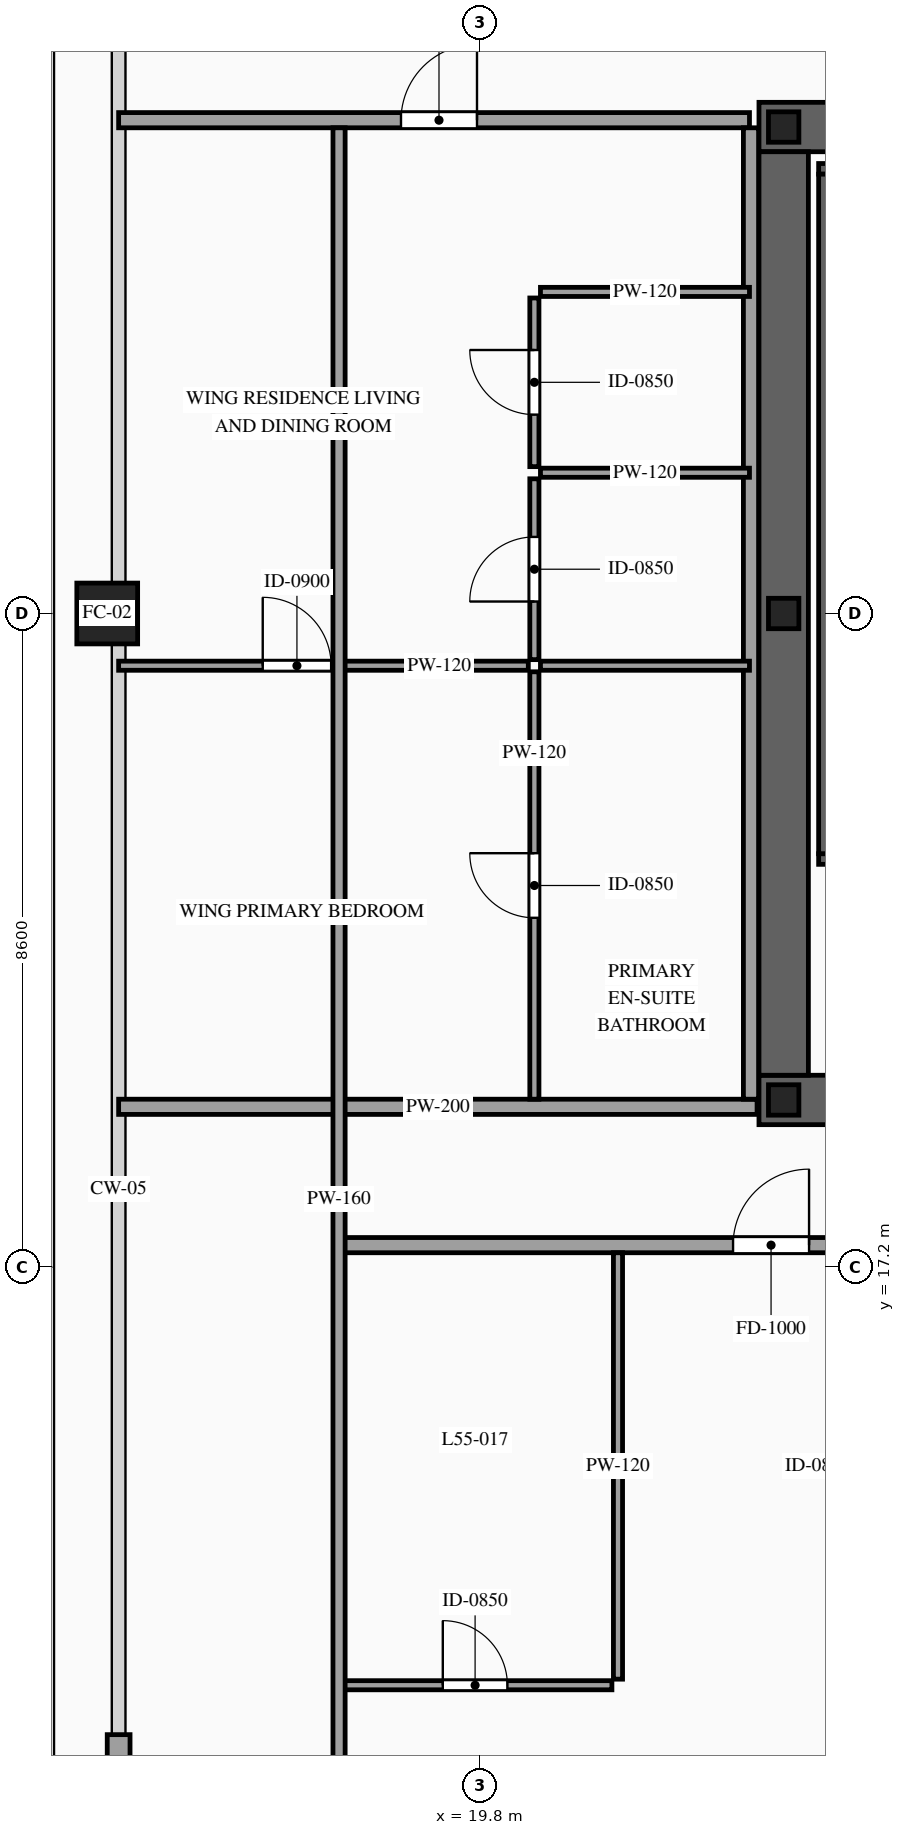
"""IFC4 building model, lengths in metres.
Left out: names, types, materials, properties, quantities, classifications, styles, units other than length and angle.
Written with IfcOpenShell. Run it as: python <this file> out.ifc"""

import sys

from ifc_helpers import new_model, si_unit, direction, frame, frame_2d, origin, origin_2d, place, context, subcontext, project, spatial, rectangle, hollow_rectangle, i_section, extrude, source, transform, mapped, element, fill, save


model = new_model("IFC4")
c1 = context("Model", 3, precision=1e-05, world=origin(), true_north=direction((0.0, 1.0)))
c2 = subcontext(c1, "Body", "Model", "MODEL_VIEW")
j1 = project(units=[si_unit("LENGTHUNIT", "METRE"), si_unit("PLANEANGLEUNIT", "RADIAN")], contexts=[c1])
p1 = place(None, origin())
s1 = spatial("IfcSite", under=j1, at=p1, CompositionType="ELEMENT")
p2 = place(p1, origin())
s2 = spatial("IfcBuilding", under=s1, at=p2, CompositionType="ELEMENT")
p3 = place(p2, frame((0.0, 0.0, 209.0)))
s3 = spatial("IfcBuildingStorey", under=s2, at=p3, CompositionType="ELEMENT", Elevation=209.0)
p4 = place(p3, frame((23.475, 19.4, 0.0), z_axis=(0.0, 0.0, 1.0), x_axis=(1.0, 0.0, 0.0)))
e1 = element("IfcWall", 1, at=p4, inside=s3, PredefinedType="SHEAR", context=c2, shape_type="SweptSolid", body=[
    extrude(rectangle(XDim=27.05, YDim=0.65, at=frame_2d((13.525, 0.0))), origin(), (0.0, 0.0, 1.0), 3.5),
])
p5 = place(p4, frame((1.975, 0.0, 0.0)))
e2 = element("IfcOpeningElement", 2, at=p5, cuts=e1, PredefinedType="OPENING", context=c2, shape_type="SweptSolid", body=[
    extrude(rectangle(XDim=1.1, YDim=2.2, at=frame_2d((0.55, 1.1))), frame((0.0, 0.34, 0.0), z_axis=(0.0, -1.0, 0.0), x_axis=(1.0, 0.0, 0.0)), (0.0, 0.0, 1.0), 0.68),
])
p6 = place(p4, frame((9.875, 0.0, 0.0)))
e3 = element("IfcOpeningElement", 3, at=p6, cuts=e1, PredefinedType="OPENING", context=c2, shape_type="SweptSolid", body=[
    extrude(rectangle(XDim=1.1, YDim=2.2, at=frame_2d((0.55, 1.1))), frame((0.0, 0.34, 0.0), z_axis=(0.0, -1.0, 0.0), x_axis=(1.0, 0.0, 0.0)), (0.0, 0.0, 1.0), 0.68),
])
p7 = place(p4, frame((23.075, 0.0, 0.0)))
e4 = element("IfcOpeningElement", 4, at=p7, cuts=e1, PredefinedType="OPENING", context=c2, shape_type="SweptSolid", body=[
    extrude(rectangle(XDim=1.1, YDim=2.2, at=frame_2d((0.55, 1.1))), frame((0.0, 0.34, 0.0), z_axis=(0.0, -1.0, 0.0), x_axis=(1.0, 0.0, 0.0)), (0.0, 0.0, 1.0), 0.68),
])
p8 = place(p4, frame((19.695, 0.0, 0.0)))
e5 = element("IfcOpeningElement", 5, at=p8, cuts=e1, PredefinedType="OPENING", context=c2, shape_type="SweptSolid", body=[
    extrude(rectangle(XDim=0.9, YDim=2.15, at=frame_2d((0.45, 1.075))), frame((0.0, 0.34, 0.0), z_axis=(0.0, -1.0, 0.0), x_axis=(1.0, 0.0, 0.0)), (0.0, 0.0, 1.0), 0.68),
])
p9 = place(p4, frame((18.255, 0.0, 0.0)))
e6 = element("IfcOpeningElement", 6, at=p9, cuts=e1, PredefinedType="OPENING", context=c2, shape_type="SweptSolid", body=[
    extrude(rectangle(XDim=0.9, YDim=2.15, at=frame_2d((0.45, 1.075))), frame((0.0, 0.34, 0.0), z_axis=(0.0, -1.0, 0.0), x_axis=(1.0, 0.0, 0.0)), (0.0, 0.0, 1.0), 0.68),
])
p10 = place(p3, frame((23.475, 32.2, 0.0), z_axis=(0.0, 0.0, 1.0), x_axis=(1.0, 0.0, 0.0)))
e7 = element("IfcWall", 7, at=p10, inside=s3, PredefinedType="SHEAR", context=c2, shape_type="SweptSolid", body=[
    extrude(rectangle(XDim=27.05, YDim=0.65, at=frame_2d((13.525, 0.0))), origin(), (0.0, 0.0, 1.0), 3.5),
])
p11 = place(p10, frame((4.595, 0.0, 0.0)))
e8 = element("IfcOpeningElement", 8, at=p11, cuts=e7, PredefinedType="OPENING", context=c2, shape_type="SweptSolid", body=[
    extrude(rectangle(XDim=0.9, YDim=2.15, at=frame_2d((0.45, 1.075))), frame((0.0, 0.34, 0.0), z_axis=(0.0, -1.0, 0.0), x_axis=(1.0, 0.0, 0.0)), (0.0, 0.0, 1.0), 0.68),
])
p12 = place(p10, frame((9.875, 0.0, 0.0)))
e9 = element("IfcOpeningElement", 9, at=p12, cuts=e7, PredefinedType="OPENING", context=c2, shape_type="SweptSolid", body=[
    extrude(rectangle(XDim=1.1, YDim=2.2, at=frame_2d((0.55, 1.1))), frame((0.0, 0.34, 0.0), z_axis=(0.0, -1.0, 0.0), x_axis=(1.0, 0.0, 0.0)), (0.0, 0.0, 1.0), 0.68),
])
p13 = place(p10, frame((15.725, 0.0, 0.0)))
e10 = element("IfcOpeningElement", 10, at=p13, cuts=e7, PredefinedType="OPENING", context=c2, shape_type="SweptSolid", body=[
    extrude(rectangle(XDim=1.1, YDim=2.2, at=frame_2d((0.55, 1.1))), frame((0.0, 0.34, 0.0), z_axis=(0.0, -1.0, 0.0), x_axis=(1.0, 0.0, 0.0)), (0.0, 0.0, 1.0), 0.68),
])
m1 = source(origin(), c2, "Body", "SweptSolid", [
    extrude(rectangle(XDim=12.15, YDim=0.65, at=frame_2d((6.075, 0.0))), origin(), (0.0, 0.0, 1.0), 3.5),
])
p14 = place(p3, frame((23.8, 19.725, 0.0), z_axis=(0.0, 0.0, 1.0), x_axis=(0.0, 1.0, 0.0)))
e11 = element("IfcWall", 11, at=p14, inside=s3, PredefinedType="SHEAR", context=c2, shape_type="MappedRepresentation", body=[
    mapped(m1, transform((0.0, 0.0, 0.0), scale=1.0)),
])
m2 = source(origin(), c2, "Body", "SweptSolid", [
    extrude(i_section(OverallWidth=0.4, OverallDepth=0.4, WebThickness=0.013, FlangeThickness=0.021, at=origin_2d()), origin(), (0.0, 0.0, 1.0), 3.5),
])
for number, where, z_axis, x_axis in (
    (12, (23.8, 19.4, 0.0), (0.0, 0.0, 1.0), (1.0, 0.0, 0.0)),
    (13, (23.8, 25.8, 0.0), (0.0, 0.0, 1.0), (1.0, 0.0, 0.0)),
    (14, (23.8, 32.2, 0.0), (0.0, 0.0, 1.0), (1.0, 0.0, 0.0)),
):
    element("IfcColumn", number, at=place(p3, frame(where, z_axis=z_axis, x_axis=x_axis)), inside=s3, PredefinedType="COLUMN", context=c2, shape_type="MappedRepresentation", body=[
        mapped(m2, transform((0.0, 0.0, 0.0), scale=1.0)),
    ])
m3 = source(origin(), c2, "Body", "SweptSolid", [
    extrude(hollow_rectangle(XDim=0.8, YDim=0.8, WallThickness=0.036, at=origin_2d()), origin(), (0.0, 0.0, 1.0), 3.5),
])
p15 = place(p3, frame((14.9, 25.8, 0.0), z_axis=(0.0, 0.0, 1.0), x_axis=(1.0, 0.0, 0.0)))
e15 = element("IfcColumn", 15, at=p15, inside=s3, PredefinedType="COLUMN", context=c2, shape_type="MappedRepresentation", body=[
    mapped(m3, transform((0.0, 0.0, 0.0), scale=1.0)),
])
m4 = source(origin(), c2, "Body", "SweptSolid", [
    extrude(rectangle(XDim=3.05, YDim=0.3, at=frame_2d((1.525, 0.0))), origin(), (0.0, 0.0, 1.0), 2.835),
])
p16 = place(p3, frame((15.05, 8.0, 0.0), z_axis=(0.0, 0.0, 1.0), x_axis=(0.0, 1.0, 0.0)))
e16 = element("IfcWall", 16, at=p16, inside=s3, PredefinedType="SOLIDWALL", context=c2, shape_type="MappedRepresentation", body=[
    mapped(m4, transform((0.0, 0.0, 0.0), scale=1.0)),
])
p17 = place(p3, frame((24.26, 22.57, 0.0), z_axis=(0.0, 0.0, 1.0), x_axis=(1.0, 0.0, 0.0)))
e17 = element("IfcWall", 17, at=p17, inside=s3, PredefinedType="SOLIDWALL", context=c2, shape_type="SweptSolid", body=[
    extrude(rectangle(XDim=3.28, YDim=0.14, at=frame_2d((1.64, 0.0))), origin(), (0.0, 0.0, 1.0), 3.28),
])
p18 = place(p17, frame((1.09, 0.0, 0.0)))
e18 = element("IfcOpeningElement", 18, at=p18, cuts=e17, PredefinedType="OPENING", context=c2, shape_type="SweptSolid", body=[
    extrude(rectangle(XDim=1.1, YDim=2.2, at=frame_2d((0.55, 1.1))), frame((0.0, 0.085, 0.0), z_axis=(0.0, -1.0, 0.0), x_axis=(1.0, 0.0, 0.0)), (0.0, 0.0, 1.0), 0.17),
])
m5 = source(origin(), c2, "Body", "SweptSolid", [
    extrude(rectangle(XDim=3.28, YDim=0.14, at=frame_2d((1.64, 0.0))), origin(), (0.0, 0.0, 1.0), 3.28),
])
p19 = place(p3, frame((24.26, 31.65, 0.0), z_axis=(0.0, 0.0, 1.0), x_axis=(1.0, 0.0, 0.0)))
e19 = element("IfcWall", 19, at=p19, inside=s3, PredefinedType="SOLIDWALL", context=c2, shape_type="MappedRepresentation", body=[
    mapped(m5, transform((0.0, 0.0, 0.0), scale=1.0)),
])
m6 = source(origin(), c2, "Body", "SweptSolid", [
    extrude(rectangle(XDim=8.94, YDim=0.14, at=frame_2d((4.47, 0.0))), origin(), (0.0, 0.0, 1.0), 3.28),
])
p20 = place(p3, frame((24.33, 22.64, 0.0), z_axis=(0.0, 0.0, 1.0), x_axis=(0.0, 1.0, 0.0)))
e20 = element("IfcWall", 20, at=p20, inside=s3, PredefinedType="SOLIDWALL", context=c2, shape_type="MappedRepresentation", body=[
    mapped(m6, transform((0.0, 0.0, 0.0), scale=1.0)),
])
p21 = place(p3, frame((17.94, 17.49, 0.0), z_axis=(0.0, 0.0, 1.0), x_axis=(1.0, 0.0, 0.0)))
e21 = element("IfcWall", 21, at=p21, inside=s3, PredefinedType="PARTITIONING", context=c2, shape_type="SweptSolid", body=[
    extrude(rectangle(XDim=12.5, YDim=0.2, at=frame_2d((6.25, 0.0))), origin(), (0.0, 0.0, 1.0), 3.28),
])
p22 = place(p21, frame((5.194, 0.0, 0.0)))
e22 = element("IfcOpeningElement", 22, at=p22, cuts=e21, PredefinedType="OPENING", context=c2, shape_type="SweptSolid", body=[
    extrude(rectangle(XDim=1.0, YDim=2.2, at=frame_2d((0.5, 1.1))), frame((0.0, 0.115, 0.0), z_axis=(0.0, -1.0, 0.0), x_axis=(1.0, 0.0, 0.0)), (0.0, 0.0, 1.0), 0.23),
])
p23 = place(p3, frame((17.94, 11.7, 0.0), z_axis=(0.0, 0.0, 1.0), x_axis=(1.0, 0.0, 0.0)))
e23 = element("IfcWall", 23, at=p23, inside=s3, PredefinedType="PARTITIONING", context=c2, shape_type="SweptSolid", body=[
    extrude(rectangle(XDim=3.6, YDim=0.12, at=frame_2d((1.8, 0.0))), origin(), (0.0, 0.0, 1.0), 3.28),
])
p24 = place(p23, frame((1.375, 0.0, 0.0)))
e24 = element("IfcOpeningElement", 24, at=p24, cuts=e23, PredefinedType="OPENING", context=c2, shape_type="SweptSolid", body=[
    extrude(rectangle(XDim=0.85, YDim=2.1, at=frame_2d((0.425, 1.05))), frame((0.0, 0.075, 0.0), z_axis=(0.0, -1.0, 0.0), x_axis=(1.0, 0.0, 0.0)), (0.0, 0.0, 1.0), 0.15),
])
m7 = source(origin(), c2, "Body", "SweptSolid", [
    extrude(rectangle(XDim=5.61, YDim=0.12, at=frame_2d((2.805, 0.0))), origin(), (0.0, 0.0, 1.0), 3.28),
])
p25 = place(p3, frame((21.62, 11.78, 0.0), z_axis=(0.0, 0.0, 1.0), x_axis=(0.0, 1.0, 0.0)))
e25 = element("IfcWall", 25, at=p25, inside=s3, PredefinedType="PARTITIONING", context=c2, shape_type="MappedRepresentation", body=[
    mapped(m7, transform((0.0, 0.0, 0.0), scale=1.0)),
])
p26 = place(p3, frame((15.05, 32.29, 0.0), z_axis=(0.0, 0.0, 1.0), x_axis=(1.0, 0.0, 0.0)))
e26 = element("IfcWall", 26, at=p26, inside=s3, PredefinedType="PARTITIONING", context=c2, shape_type="SweptSolid", body=[
    extrude(rectangle(XDim=8.3, YDim=0.2, at=frame_2d((4.15, 0.0))), origin(), (0.0, 0.0, 1.0), 2.775),
])
p27 = place(p26, frame((3.715, 0.0, 0.0)))
e27 = element("IfcOpeningElement", 27, at=p27, cuts=e26, PredefinedType="OPENING", context=c2, shape_type="SweptSolid", body=[
    extrude(rectangle(XDim=1.0, YDim=2.2, at=frame_2d((0.5, 1.1))), frame((0.0, 0.115, 0.0), z_axis=(0.0, -1.0, 0.0), x_axis=(1.0, 0.0, 0.0)), (0.0, 0.0, 1.0), 0.23),
])
m8 = source(origin(), c2, "Body", "SweptSolid", [
    extrude(rectangle(XDim=8.4, YDim=0.2, at=frame_2d((4.2, 0.0))), origin(), (0.0, 0.0, 1.0), 2.775),
])
p28 = place(p3, frame((15.05, 19.31, 0.0), z_axis=(0.0, 0.0, 1.0), x_axis=(1.0, 0.0, 0.0)))
e28 = element("IfcWall", 28, at=p28, inside=s3, PredefinedType="PARTITIONING", context=c2, shape_type="MappedRepresentation", body=[
    mapped(m8, transform((0.0, 0.0, 0.0), scale=1.0)),
])
m9 = source(origin(), c2, "Body", "SweptSolid", [
    extrude(rectangle(XDim=12.78, YDim=0.2, at=frame_2d((6.39, 0.0))), origin(), (0.0, 0.0, 1.0), 3.28),
])
p29 = place(p3, frame((23.37, 19.41, 0.0), z_axis=(0.0, 0.0, 1.0), x_axis=(0.0, 1.0, 0.0)))
e29 = element("IfcWall", 29, at=p29, inside=s3, PredefinedType="PARTITIONING", context=c2, shape_type="MappedRepresentation", body=[
    mapped(m9, transform((0.0, 0.0, 0.0), scale=1.0)),
])
m10 = source(origin(), c2, "Body", "SweptSolid", [
    extrude(rectangle(XDim=2.75, YDim=0.12, at=frame_2d((1.375, 0.0))), origin(), (0.0, 0.0, 1.0), 3.28),
])
for number, where, z_axis, x_axis in (
    (30, (20.6, 25.113, 0.0), (0.0, 0.0, 1.0), (1.0, 0.0, 0.0)),
    (31, (20.6, 27.652, 0.0), (0.0, 0.0, 1.0), (1.0, 0.0, 0.0)),
):
    element("IfcWall", number, at=place(p3, frame(where, z_axis=z_axis, x_axis=x_axis)), inside=s3, PredefinedType="PARTITIONING", context=c2, shape_type="MappedRepresentation", body=[
        mapped(m10, transform((0.0, 0.0, 0.0), scale=1.0)),
    ])
p30 = place(p3, frame((20.52, 25.193, 0.0), z_axis=(0.0, 0.0, 1.0), x_axis=(0.0, 1.0, 0.0)))
e32 = element("IfcWall", 32, at=p30, inside=s3, PredefinedType="PARTITIONING", context=c2, shape_type="SweptSolid", body=[
    extrude(rectangle(XDim=2.379, YDim=0.12, at=frame_2d((1.189, 0.0))), origin(), (0.0, 0.0, 1.0), 3.28),
])
p31 = place(p30, frame((0.764, 0.0, 0.0)))
e33 = element("IfcOpeningElement", 33, at=p31, cuts=e32, PredefinedType="OPENING", context=c2, shape_type="SweptSolid", body=[
    extrude(rectangle(XDim=0.85, YDim=2.1, at=frame_2d((0.425, 1.05))), frame((0.0, 0.075, 0.0), z_axis=(0.0, -1.0, 0.0), x_axis=(1.0, 0.0, 0.0)), (0.0, 0.0, 1.0), 0.15),
])
p32 = place(p3, frame((20.6, 30.031, 0.0), z_axis=(0.0, 0.0, 1.0), x_axis=(1.0, 0.0, 0.0)))
e34 = element("IfcWall", 34, at=p32, inside=s3, PredefinedType="PARTITIONING", context=c2, shape_type="MappedRepresentation", body=[
    mapped(m10, transform((0.0, 0.0, 0.0), scale=1.0)),
])
p33 = place(p3, frame((20.52, 27.732, 0.0), z_axis=(0.0, 0.0, 1.0), x_axis=(0.0, 1.0, 0.0)))
e35 = element("IfcWall", 35, at=p33, inside=s3, PredefinedType="PARTITIONING", context=c2, shape_type="SweptSolid", body=[
    extrude(rectangle(XDim=2.219, YDim=0.12, at=frame_2d((1.109, 0.0))), origin(), (0.0, 0.0, 1.0), 3.28),
])
p34 = place(p33, frame((0.685, 0.0, 0.0)))
e36 = element("IfcOpeningElement", 36, at=p34, cuts=e35, PredefinedType="OPENING", context=c2, shape_type="SweptSolid", body=[
    extrude(rectangle(XDim=0.85, YDim=2.1, at=frame_2d((0.425, 1.05))), frame((0.0, 0.075, 0.0), z_axis=(0.0, -1.0, 0.0), x_axis=(1.0, 0.0, 0.0)), (0.0, 0.0, 1.0), 0.15),
])
p35 = place(p3, frame((15.05, 25.113, 0.0), z_axis=(0.0, 0.0, 1.0), x_axis=(1.0, 0.0, 0.0)))
e37 = element("IfcWall", 37, at=p35, inside=s3, PredefinedType="PARTITIONING", context=c2, shape_type="SweptSolid", body=[
    extrude(rectangle(XDim=5.39, YDim=0.12, at=frame_2d((2.695, 0.0))), origin(), (0.0, 0.0, 1.0), 3.28),
])
p36 = place(p35, frame((1.896, 0.0, 0.0)))
e38 = element("IfcOpeningElement", 38, at=p36, cuts=e37, PredefinedType="OPENING", context=c2, shape_type="SweptSolid", body=[
    extrude(rectangle(XDim=0.9, YDim=2.15, at=frame_2d((0.45, 1.075))), frame((0.0, 0.075, 0.0), z_axis=(0.0, -1.0, 0.0), x_axis=(1.0, 0.0, 0.0)), (0.0, 0.0, 1.0), 0.15),
])
p37 = place(p3, frame((20.52, 19.41, 0.0), z_axis=(0.0, 0.0, 1.0), x_axis=(0.0, 1.0, 0.0)))
e39 = element("IfcWall", 39, at=p37, inside=s3, PredefinedType="PARTITIONING", context=c2, shape_type="SweptSolid", body=[
    extrude(rectangle(XDim=5.623, YDim=0.12, at=frame_2d((2.812, 0.0))), origin(), (0.0, 0.0, 1.0), 3.28),
])
p38 = place(p37, frame((2.386, 0.0, 0.0)))
e40 = element("IfcOpeningElement", 40, at=p38, cuts=e39, PredefinedType="OPENING", context=c2, shape_type="SweptSolid", body=[
    extrude(rectangle(XDim=0.85, YDim=2.1, at=frame_2d((0.425, 1.05))), frame((0.0, 0.075, 0.0), z_axis=(0.0, -1.0, 0.0), x_axis=(1.0, 0.0, 0.0)), (0.0, 0.0, 1.0), 0.15),
])
m11 = source(origin(), c2, "Body", "SweptSolid", [
    extrude(rectangle(XDim=28.19, YDim=0.16, at=frame_2d((14.095, 0.0))), origin(), (0.0, 0.0, 1.0), 3.28),
])
p39 = place(p3, frame((17.95, 4.0, 0.0), z_axis=(0.0, 0.0, 1.0), x_axis=(0.0, 1.0, 0.0)))
e41 = element("IfcWall", 41, at=p39, inside=s3, PredefinedType="PARTITIONING", context=c2, shape_type="MappedRepresentation", body=[
    mapped(m11, transform((0.0, 0.0, 0.0), scale=1.0)),
])
m12 = source(origin(), c2, "Body", "SweptSolid", [
    extrude(rectangle(XDim=1.0, YDim=2.2, at=frame_2d((0.5, 1.1))), frame((0.0, 0.025, 0.0), z_axis=(0.0, -1.0, 0.0), x_axis=(1.0, 0.0, 0.0)), (0.0, 0.0, 1.0), 0.05),
])
p40 = place(p22, origin())
e42 = element("IfcDoor", 42, at=p40, inside=s3, OperationType="SINGLE_SWING_RIGHT", PredefinedType="DOOR", context=c2, shape_type="MappedRepresentation", body=[
    mapped(m12, transform((0.0, 0.0, 0.0), scale=1.0)),
])
fill(e22, e42)
m13 = source(origin(), c2, "Body", "SweptSolid", [
    extrude(rectangle(XDim=0.85, YDim=2.1, at=frame_2d((0.425, 1.05))), frame((0.0, 0.025, 0.0), z_axis=(0.0, -1.0, 0.0), x_axis=(1.0, 0.0, 0.0)), (0.0, 0.0, 1.0), 0.05),
])
p41 = place(p24, origin())
e43 = element("IfcDoor", 43, at=p41, inside=s3, OperationType="SINGLE_SWING_LEFT", PredefinedType="DOOR", context=c2, shape_type="MappedRepresentation", body=[
    mapped(m13, transform((0.0, 0.0, 0.0), scale=1.0)),
])
fill(e24, e43)
p42 = place(p27, origin())
e44 = element("IfcDoor", 44, at=p42, inside=s3, OperationType="SINGLE_SWING_RIGHT", PredefinedType="DOOR", context=c2, shape_type="MappedRepresentation", body=[
    mapped(m12, transform((0.0, 0.0, 0.0), scale=1.0)),
])
fill(e27, e44)
p43 = place(p31, origin())
e45 = element("IfcDoor", 45, at=p43, inside=s3, OperationType="SINGLE_SWING_LEFT", PredefinedType="DOOR", context=c2, shape_type="MappedRepresentation", body=[
    mapped(m13, transform((0.0, 0.0, 0.0), scale=1.0)),
])
fill(e33, e45)
p44 = place(p34, origin())
e46 = element("IfcDoor", 46, at=p44, inside=s3, OperationType="SINGLE_SWING_RIGHT", PredefinedType="DOOR", context=c2, shape_type="MappedRepresentation", body=[
    mapped(m13, transform((0.0, 0.0, 0.0), scale=1.0)),
])
fill(e36, e46)
m14 = source(origin(), c2, "Body", "SweptSolid", [
    extrude(rectangle(XDim=0.9, YDim=2.15, at=frame_2d((0.45, 1.075))), frame((0.0, 0.025, 0.0), z_axis=(0.0, -1.0, 0.0), x_axis=(1.0, 0.0, 0.0)), (0.0, 0.0, 1.0), 0.05),
])
p45 = place(p36, origin())
e47 = element("IfcDoor", 47, at=p45, inside=s3, OperationType="SINGLE_SWING_LEFT", PredefinedType="DOOR", context=c2, shape_type="MappedRepresentation", body=[
    mapped(m14, transform((0.0, 0.0, 0.0), scale=1.0)),
])
fill(e38, e47)
p46 = place(p38, origin())
e48 = element("IfcDoor", 48, at=p46, inside=s3, OperationType="SINGLE_SWING_RIGHT", PredefinedType="DOOR", context=c2, shape_type="MappedRepresentation", body=[
    mapped(m13, transform((0.0, 0.0, 0.0), scale=1.0)),
])
fill(e40, e48)
save(model, sys.argv[1])
